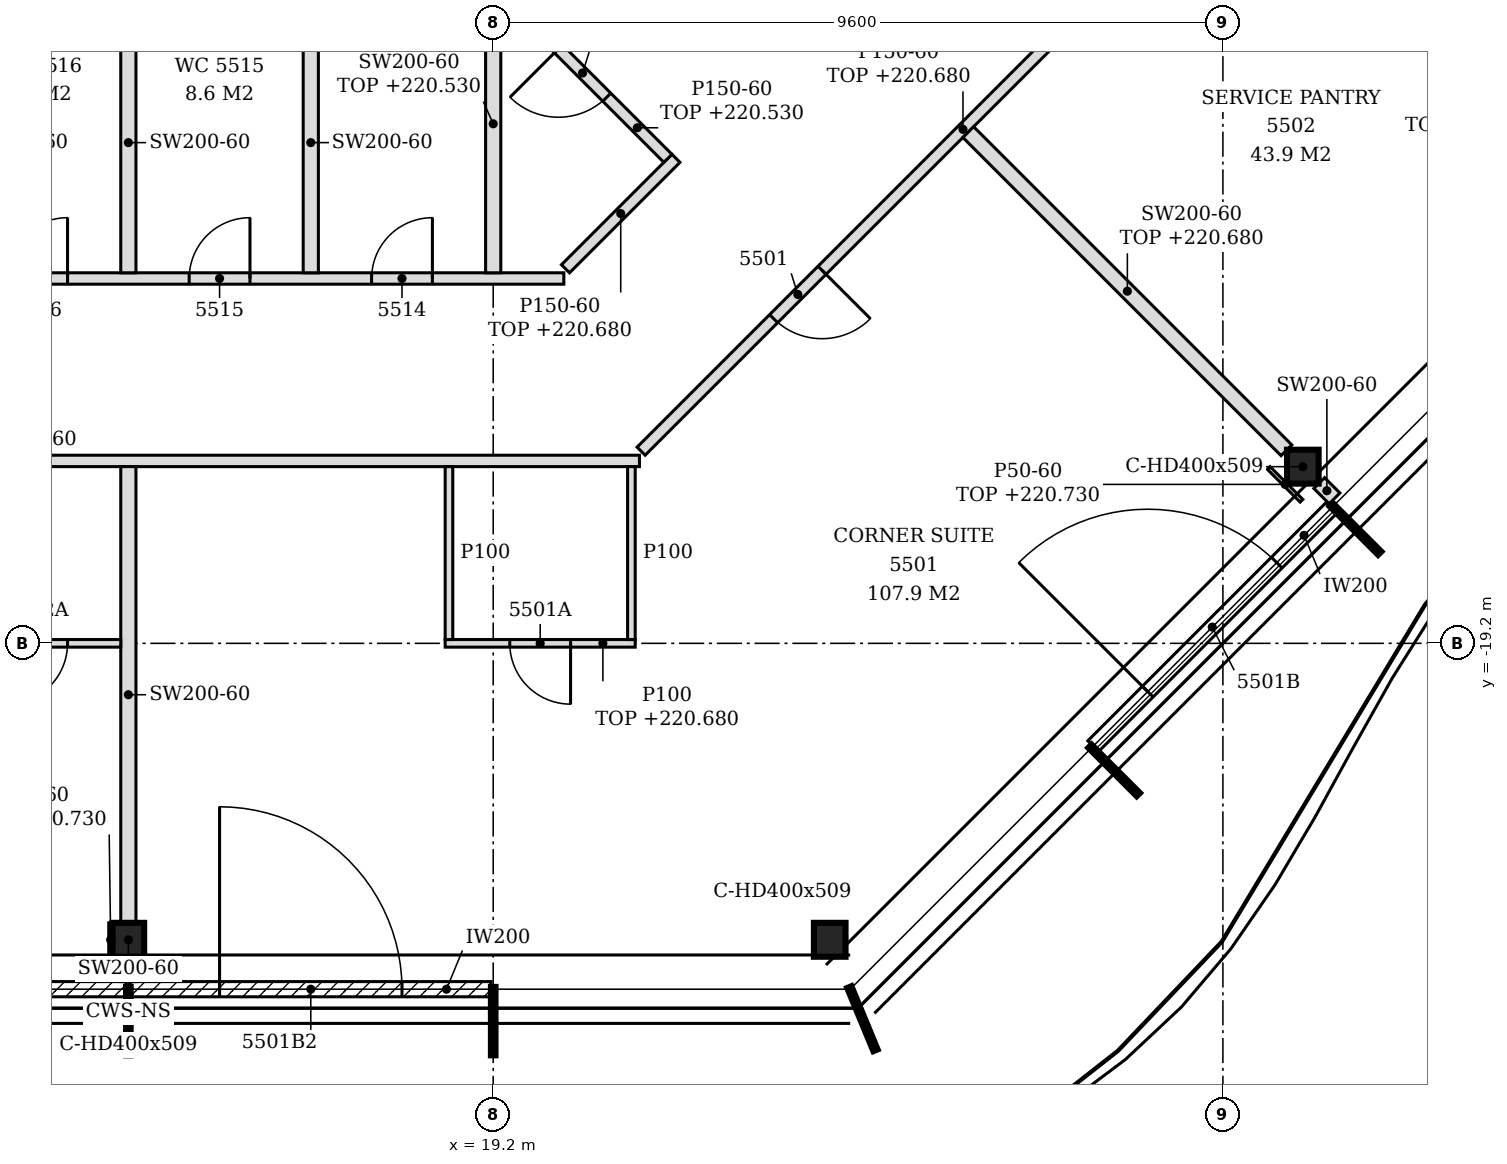
"""IFC4 building model, lengths in metres.
Left out: names, types, materials, properties, quantities, classifications, styles, units other than length and angle.
Written with IfcOpenShell. Run it as: python <this file> out.ifc"""

import sys

from ifc_helpers import new_model, si_unit, direction, frame, frame_2d, origin, origin_2d, place, context, subcontext, project, spatial, polyline, rectangle, i_section, outline, extrude, element, fill, save


model = new_model("IFC4")
c1 = context("Model", 3, precision=1e-05, world=origin(), true_north=direction((0.0, 1.0)))
c2 = subcontext(c1, "Body", "Model", "MODEL_VIEW")
j1 = project(units=[si_unit("LENGTHUNIT", "METRE"), si_unit("PLANEANGLEUNIT", "RADIAN")], contexts=[c1])
p1 = place(None, origin())
s1 = spatial("IfcSite", under=j1, at=p1, CompositionType="ELEMENT")
p2 = place(p1, origin())
s2 = spatial("IfcBuilding", under=s1, at=p2, CompositionType="ELEMENT")
p3 = place(p2, frame((0.0, 0.0, 217.8)))
s3 = spatial("IfcBuildingStorey", under=s2, at=p3, CompositionType="ELEMENT", Elevation=217.8)
for number, where, z_axis, x_axis in (
    (1, (14.4, -23.1, -0.15), (0.0, 0.0, 1.0), (1.0, 0.0, 0.0)),
    (2, (23.627, -23.1, -0.15), (0.0, 0.0, 1.0), (1.0, 0.0, 0.0)),
    (3, (29.852, -16.876, -0.15), (0.0, 0.0, 1.0), (1.0, 0.0, 0.0)),
):
    element("IfcColumn", number, at=place(p3, frame(where, z_axis=z_axis, x_axis=x_axis)), inside=s3, PredefinedType="COLUMN", context=c2, shape_type="SweptSolid", body=[
        extrude(i_section(OverallWidth=0.416, OverallDepth=0.446, WebThickness=0.039, FlangeThickness=0.063, FilletRadius=0.015, at=origin_2d()), origin(), (0.0, 0.0, 1.0), 3.6),
    ])
p4 = place(p3, frame((9.63, -23.75, 0.0), z_axis=(0.0, 0.0, 1.0), x_axis=(1.0, 0.0, 0.0)))
e4 = element("IfcWall", 4, at=p4, inside=s3, PredefinedType="NOTDEFINED", context=c2, shape_type="SweptSolid", body=[
    extrude(rectangle(XDim=4.74, YDim=0.2, at=frame_2d((2.37, 0.0))), origin(), (0.0, 0.0, 1.0), 3.45),
])
p5 = place(p4, frame((1.17, 0.0, 0.0)))
e5 = element("IfcOpeningElement", 5, at=p5, cuts=e4, PredefinedType="OPENING", context=c2, shape_type="SweptSolid", body=[
    extrude(rectangle(XDim=2.4, YDim=2.4, at=frame_2d((1.2, 1.2))), frame((0.0, 0.11, 0.0), z_axis=(0.0, -1.0, 0.0), x_axis=(1.0, 0.0, 0.0)), (0.0, 0.0, 1.0), 0.22),
])
p6 = place(p3, frame((14.43, -23.75, 0.0), z_axis=(0.0, 0.0, 1.0), x_axis=(1.0, 0.0, 0.0)))
e6 = element("IfcWall", 6, at=p6, inside=s3, PredefinedType="NOTDEFINED", context=c2, shape_type="SweptSolid", body=[
    extrude(rectangle(XDim=4.74, YDim=0.2, at=frame_2d((2.37, 0.0))), origin(), (0.0, 0.0, 1.0), 3.45),
])
p7 = place(p6, frame((1.17, 0.0, 0.0)))
e7 = element("IfcOpeningElement", 7, at=p7, cuts=e6, PredefinedType="OPENING", context=c2, shape_type="SweptSolid", body=[
    extrude(rectangle(XDim=2.4, YDim=2.4, at=frame_2d((1.2, 1.2))), frame((0.0, 0.11, 0.0), z_axis=(0.0, -1.0, 0.0), x_axis=(1.0, 0.0, 0.0)), (0.0, 0.0, 1.0), 0.22),
])
p8 = place(p3, frame((27.093, -20.553, 0.0), z_axis=(0.0, 0.0, 1.0), x_axis=(0.707079231393, 0.707134329907, 0.0)))
e8 = element("IfcWall", 8, at=p8, inside=s3, PredefinedType="NOTDEFINED", context=c2, shape_type="SweptSolid", body=[
    extrude(rectangle(XDim=4.431, YDim=0.2, at=frame_2d((2.215, 0.0))), origin(), (0.0, 0.0, 1.0), 3.45),
])
p9 = place(p8, frame((1.015, 0.0, 0.0)))
e9 = element("IfcOpeningElement", 9, at=p9, cuts=e8, PredefinedType="OPENING", context=c2, shape_type="SweptSolid", body=[
    extrude(rectangle(XDim=2.4, YDim=2.4, at=frame_2d((1.2, 1.2))), frame((0.0, 0.11, 0.0), z_axis=(0.0, -1.0, 0.0), x_axis=(1.0, 0.0, 0.0)), (0.0, 0.0, 1.0), 0.22),
])
p10 = place(p3, frame((14.4, -23.65, 0.0), z_axis=(0.0, 0.0, 1.0), x_axis=(0.0, 1.0, 0.0)))
e10 = element("IfcWall", 10, at=p10, inside=s3, PredefinedType="PARTITIONING", context=c2, shape_type="SweptSolid", body=[
    extrude(rectangle(XDim=0.327, YDim=0.2, at=frame_2d((0.164, 0.0))), origin(), (0.0, 0.0, 1.0), 3.45),
])
p11 = place(p3, frame((14.4, -22.877, 0.0), z_axis=(0.0, 0.0, 1.0), x_axis=(0.0, 1.0, 0.0)))
e11 = element("IfcWall", 11, at=p11, inside=s3, PredefinedType="PARTITIONING", context=c2, shape_type="SweptSolid", body=[
    extrude(outline(polyline([(0.0, 0.0), (6.002, 0.0), (6.002, 3.45), (3.782, 3.45), (3.78, 2.88), (3.572, 2.88), (3.57, 3.45), (0.0, 3.45), (0.0, 0.0)])), frame((0.0, 0.1, 0.0), z_axis=(0.0, -1.0, 0.0), x_axis=(1.0, 0.0, 0.0)), (0.0, 0.0, 1.0), 0.2),
])
p12 = place(p3, frame((11.95, -19.2, 0.0), z_axis=(0.0, 0.0, 1.0), x_axis=(1.0, 0.0, 0.0)))
e12 = element("IfcWall", 12, at=p12, inside=s3, PredefinedType="PARTITIONING", context=c2, shape_type="SweptSolid", body=[
    extrude(rectangle(XDim=2.35, YDim=0.1, at=frame_2d((1.175, 0.0))), origin(), (0.0, 0.0, 1.0), 2.88),
])
p13 = place(p12, frame((0.85, 0.0, 0.0)))
e13 = element("IfcOpeningElement", 13, at=p13, cuts=e12, PredefinedType="OPENING", context=c2, shape_type="SweptSolid", body=[
    extrude(rectangle(XDim=0.8, YDim=2.1, at=frame_2d((0.4, 1.05))), frame((0.0, 0.06, 0.0), z_axis=(0.0, -1.0, 0.0), x_axis=(1.0, 0.0, 0.0)), (0.0, 0.0, 1.0), 0.12),
])
p14 = place(p3, frame((18.568, -19.2, 0.0), z_axis=(0.0, 0.0, 1.0), x_axis=(1.0, 0.0, 0.0)))
e14 = element("IfcWall", 14, at=p14, inside=s3, PredefinedType="PARTITIONING", context=c2, shape_type="SweptSolid", body=[
    extrude(outline(polyline([(0.0, 0.0), (2.5, 0.0), (2.5, 2.88), (0.782, 2.88), (0.78, 2.73), (0.482, 2.73), (0.48, 2.88), (0.0, 2.88), (0.0, 0.0)])), frame((0.0, 0.05, 0.0), z_axis=(0.0, -1.0, 0.0), x_axis=(1.0, 0.0, 0.0)), (0.0, 0.0, 1.0), 0.1),
])
p15 = place(p14, frame((0.85, 0.0, 0.0)))
e15 = element("IfcOpeningElement", 15, at=p15, cuts=e14, PredefinedType="OPENING", context=c2, shape_type="SweptSolid", body=[
    extrude(rectangle(XDim=0.8, YDim=2.1, at=frame_2d((0.4, 1.05))), frame((0.0, 0.06, 0.0), z_axis=(0.0, -1.0, 0.0), x_axis=(1.0, 0.0, 0.0)), (0.0, 0.0, 1.0), 0.12),
])
p16 = place(p3, frame((18.618, -19.15, 0.0), z_axis=(0.0, 0.0, 1.0), x_axis=(0.0, 1.0, 0.0)))
e16 = element("IfcWall", 16, at=p16, inside=s3, PredefinedType="PARTITIONING", context=c2, shape_type="SweptSolid", body=[
    extrude(outline(polyline([(0.0, 0.0), (2.275, 0.0), (2.275, 3.45), (0.055, 3.45), (0.053, 2.88), (0.0, 2.88), (0.0, 0.0)])), frame((0.0, 0.05, 0.0), z_axis=(0.0, -1.0, 0.0), x_axis=(1.0, 0.0, 0.0)), (0.0, 0.0, 1.0), 0.1),
])
p17 = place(p3, frame((21.018, -19.15, 0.0), z_axis=(0.0, 0.0, 1.0), x_axis=(0.0, 1.0, 0.0)))
e17 = element("IfcWall", 17, at=p17, inside=s3, PredefinedType="PARTITIONING", context=c2, shape_type="SweptSolid", body=[
    extrude(outline(polyline([(0.0, 0.0), (2.275, 0.0), (2.275, 3.45), (0.045, 3.45), (0.043, 2.98), (0.0, 2.98), (0.0, 0.0)])), frame((0.0, 0.05, 0.0), z_axis=(0.0, -1.0, 0.0), x_axis=(1.0, 0.0, 0.0)), (0.0, 0.0, 1.0), 0.1),
])
p18 = place(p3, frame((30.269, -17.293, 0.0), z_axis=(0.0, 0.0, 1.0), x_axis=(-0.707106781187, 0.707106781187, 0.0)))
e18 = element("IfcWall", 18, at=p18, inside=s3, PredefinedType="PARTITIONING", context=c2, shape_type="SweptSolid", body=[
    extrude(rectangle(XDim=0.285, YDim=0.2, at=frame_2d((0.143, 0.0))), origin(), (0.0, 0.0, 1.0), 3.45),
])
p19 = place(p3, frame((-0.844, -16.8, 0.0), z_axis=(0.0, 0.0, 1.0), x_axis=(1.0, 0.0, 0.0)))
e19 = element("IfcWall", 19, at=p19, inside=s3, PredefinedType="PARTITIONING", context=c2, shape_type="SweptSolid", body=[
    extrude(outline(polyline([(0.0, 0.0), (21.968, 0.0), (21.968, 3.45), (20.194, 3.45), (20.191, 2.73), (19.894, 2.73), (19.892, 3.45), (8.194, 3.45), (8.191, 2.73), (7.894, 2.73), (7.892, 3.45), (0.0, 3.45), (0.0, 0.0)])), frame((0.0, 0.075, 0.0), z_axis=(0.0, -1.0, 0.0), x_axis=(1.0, 0.0, 0.0)), (0.0, 0.0, 1.0), 0.15),
])
p20 = place(p19, frame((5.194, 0.0, 0.0)))
e20 = element("IfcOpeningElement", 20, at=p20, cuts=e19, PredefinedType="OPENING", context=c2, shape_type="SweptSolid", body=[
    extrude(rectangle(XDim=0.9, YDim=2.1, at=frame_2d((0.45, 1.05))), frame((0.0, 0.085, 0.0), z_axis=(0.0, -1.0, 0.0), x_axis=(1.0, 0.0, 0.0)), (0.0, 0.0, 1.0), 0.17),
])
p21 = place(p3, frame((21.146, -16.672, 0.0), z_axis=(0.0, 0.0, 1.0), x_axis=(0.707100999376, 0.70711256295, 0.0)))
e21 = element("IfcWall", 21, at=p21, inside=s3, PredefinedType="PARTITIONING", context=c2, shape_type="SweptSolid", body=[
    extrude(rectangle(XDim=21.113, YDim=0.15, at=frame_2d((10.556, 0.0))), origin(), (0.0, 0.0, 1.0), 2.88),
])
p22 = place(p21, frame((2.466, 0.0, 0.0)))
e22 = element("IfcOpeningElement", 22, at=p22, cuts=e21, PredefinedType="OPENING", context=c2, shape_type="SweptSolid", body=[
    extrude(rectangle(XDim=0.9, YDim=2.1, at=frame_2d((0.45, 1.05))), frame((0.0, 0.085, 0.0), z_axis=(0.0, -1.0, 0.0), x_axis=(1.0, 0.0, 0.0)), (0.0, 0.0, 1.0), 0.17),
])
p23 = place(p21, frame((8.611, 0.0, 0.0)))
e23 = element("IfcOpeningElement", 23, at=p23, cuts=e21, PredefinedType="OPENING", context=c2, shape_type="SweptSolid", body=[
    extrude(rectangle(XDim=0.9, YDim=2.1, at=frame_2d((0.45, 1.05))), frame((0.0, 0.085, 0.0), z_axis=(0.0, -1.0, 0.0), x_axis=(1.0, 0.0, 0.0)), (0.0, 0.0, 1.0), 0.17),
])
p24 = place(p21, frame((13.012, 0.0, 0.0)))
e24 = element("IfcOpeningElement", 24, at=p24, cuts=e21, PredefinedType="OPENING", context=c2, shape_type="SweptSolid", body=[
    extrude(rectangle(XDim=0.9, YDim=2.1, at=frame_2d((0.45, 1.05))), frame((0.0, 0.085, 0.0), z_axis=(0.0, -1.0, 0.0), x_axis=(1.0, 0.0, 0.0)), (0.0, 0.0, 1.0), 0.17),
])
p25 = place(p21, frame((16.261, 0.0, 0.0)))
e25 = element("IfcOpeningElement", 25, at=p25, cuts=e21, PredefinedType="OPENING", context=c2, shape_type="SweptSolid", body=[
    extrude(rectangle(XDim=0.9, YDim=2.1, at=frame_2d((0.45, 1.05))), frame((0.0, 0.085, 0.0), z_axis=(0.0, -1.0, 0.0), x_axis=(1.0, 0.0, 0.0)), (0.0, 0.0, 1.0), 0.17),
])
p26 = place(p3, frame((29.636, -16.66, 0.0), z_axis=(0.0, 0.0, 1.0), x_axis=(-0.707106781187, 0.707106781187, 0.0)))
e26 = element("IfcWall", 26, at=p26, inside=s3, PredefinedType="PARTITIONING", context=c2, shape_type="SweptSolid", body=[
    extrude(rectangle(XDim=5.92, YDim=0.2, at=frame_2d((2.96, 0.0))), origin(), (0.0, 0.0, 1.0), 2.88),
])
p27 = place(p3, frame((2.325, -14.4, 0.0), z_axis=(0.0, 0.0, 1.0), x_axis=(1.0, 0.0, 0.0)))
e27 = element("IfcWall", 27, at=p27, inside=s3, PredefinedType="PARTITIONING", context=c2, shape_type="SweptSolid", body=[
    extrude(outline(polyline([(0.0, 0.0), (17.804, 0.0), (17.804, 2.88), (17.025, 2.88), (17.023, 2.73), (16.725, 2.73), (16.723, 2.88), (5.025, 2.88), (5.023, 2.73), (4.725, 2.73), (4.723, 2.88), (0.0, 2.88), (0.0, 0.0)])), frame((0.0, 0.075, 0.0), z_axis=(0.0, -1.0, 0.0), x_axis=(1.0, 0.0, 0.0)), (0.0, 0.0, 1.0), 0.15),
])
p28 = place(p27, frame((15.275, 0.0, 0.0)))
e28 = element("IfcOpeningElement", 28, at=p28, cuts=e27, PredefinedType="OPENING", context=c2, shape_type="SweptSolid", body=[
    extrude(rectangle(XDim=0.8, YDim=2.1, at=frame_2d((0.4, 1.05))), frame((0.0, 0.085, 0.0), z_axis=(0.0, -1.0, 0.0), x_axis=(1.0, 0.0, 0.0)), (0.0, 0.0, 1.0), 0.17),
])
p29 = place(p27, frame((12.875, 0.0, 0.0)))
e29 = element("IfcOpeningElement", 29, at=p29, cuts=e27, PredefinedType="OPENING", context=c2, shape_type="SweptSolid", body=[
    extrude(rectangle(XDim=0.8, YDim=2.1, at=frame_2d((0.4, 1.05))), frame((0.0, 0.085, 0.0), z_axis=(0.0, -1.0, 0.0), x_axis=(1.0, 0.0, 0.0)), (0.0, 0.0, 1.0), 0.17),
])
p30 = place(p27, frame((10.475, 0.0, 0.0)))
e30 = element("IfcOpeningElement", 30, at=p30, cuts=e27, PredefinedType="OPENING", context=c2, shape_type="SweptSolid", body=[
    extrude(rectangle(XDim=0.8, YDim=2.1, at=frame_2d((0.4, 1.05))), frame((0.0, 0.085, 0.0), z_axis=(0.0, -1.0, 0.0), x_axis=(1.0, 0.0, 0.0)), (0.0, 0.0, 1.0), 0.17),
])
for number, where, z_axis, x_axis in (
    (31, (14.4, -14.325, 0.0), (0.0, 0.0, 1.0), (0.0, 1.0, 0.0)),
    (32, (16.8, -14.325, 0.0), (0.0, 0.0, 1.0), (0.0, 1.0, 0.0)),
):
    element("IfcWall", number, at=place(p3, frame(where, z_axis=z_axis, x_axis=x_axis)), inside=s3, PredefinedType="PARTITIONING", context=c2, shape_type="SweptSolid", body=[
        extrude(outline(polyline([(0.0, 0.0), (3.425, 0.0), (3.425, 3.45), (0.03, 3.45), (0.028, 2.88), (0.0, 2.88), (0.0, 0.0)])), frame((0.0, 0.1, 0.0), z_axis=(0.0, -1.0, 0.0), x_axis=(1.0, 0.0, 0.0)), (0.0, 0.0, 1.0), 0.2),
    ])
p31 = place(p3, frame((19.2, -14.325, 0.0), z_axis=(0.0, 0.0, 1.0), x_axis=(0.0, 1.0, 0.0)))
e33 = element("IfcWall", 33, at=p31, inside=s3, PredefinedType="PARTITIONING", context=c2, shape_type="SweptSolid", body=[
    extrude(rectangle(XDim=3.92, YDim=0.2, at=frame_2d((1.96, 0.0))), origin(), (0.0, 0.0, 1.0), 2.73),
])
p32 = place(p3, frame((20.151, -14.272, 0.0), z_axis=(0.0, 0.0, 1.0), x_axis=(0.707106781187, 0.707106781187, 0.0)))
e34 = element("IfcWall", 34, at=p32, inside=s3, PredefinedType="PARTITIONING", context=c2, shape_type="SweptSolid", body=[
    extrude(rectangle(XDim=2.055, YDim=0.15, at=frame_2d((1.027, 0.0))), origin(), (0.0, 0.0, 1.0), 2.88),
])
p33 = place(p3, frame((34.581, -12.981, 0.0), z_axis=(0.0, 0.0, 1.0), x_axis=(-0.707133900936, 0.707079660397, 0.0)))
e35 = element("IfcWall", 35, at=p33, inside=s3, PredefinedType="PARTITIONING", context=c2, shape_type="SweptSolid", body=[
    extrude(rectangle(XDim=4.501, YDim=0.2, at=frame_2d((2.25, 0.0))), origin(), (0.0, 0.0, 1.0), 2.63),
])
p34 = place(p3, frame((21.498, -12.819, 0.0), z_axis=(0.0, 0.0, 1.0), x_axis=(-0.707106781187, 0.707106781187, 0.0)))
e36 = element("IfcWall", 36, at=p34, inside=s3, PredefinedType="PARTITIONING", context=c2, shape_type="SweptSolid", body=[
    extrude(rectangle(XDim=3.033, YDim=0.15, at=frame_2d((1.517, 0.0))), origin(), (0.0, 0.0, 1.0), 2.73),
])
p35 = place(p34, frame((1.137, 0.0, 0.0)))
e37 = element("IfcOpeningElement", 37, at=p35, cuts=e36, PredefinedType="OPENING", context=c2, shape_type="SweptSolid", body=[
    extrude(rectangle(XDim=0.9, YDim=2.1, at=frame_2d((0.45, 1.05))), frame((0.0, 0.085, 0.0), z_axis=(0.0, -1.0, 0.0), x_axis=(1.0, 0.0, 0.0)), (0.0, 0.0, 1.0), 0.17),
])
p36 = place(p3, frame((14.167, -23.323, 0.0), z_axis=(0.0, 0.0, 1.0), x_axis=(0.0, 1.0, 0.0)))
e38 = element("IfcWall", 38, at=p36, inside=s3, PredefinedType="PARTITIONING", context=c2, shape_type="SweptSolid", body=[
    extrude(rectangle(XDim=0.446, YDim=0.05, at=frame_2d((0.223, 0.0))), origin(), (0.0, 0.0, 1.0), 2.93),
])
p37 = place(p3, frame((29.834, -17.324, 0.0), z_axis=(0.0, 0.0, 1.0), x_axis=(-0.706906496032, 0.707307009627, 0.0)))
e39 = element("IfcWall", 39, at=p37, inside=s3, PredefinedType="PARTITIONING", context=c2, shape_type="SweptSolid", body=[
    extrude(rectangle(XDim=0.61, YDim=0.05, at=frame_2d((0.305, 0.0))), origin(), (0.0, 0.0, 1.0), 2.93),
])
p38 = place(p7, origin())
e40 = element("IfcDoor", 40, at=p38, inside=s3, OperationType="SINGLE_SWING_LEFT", PredefinedType="DOOR", context=c2, shape_type="SweptSolid", body=[
    extrude(rectangle(XDim=2.4, YDim=2.4, at=frame_2d((1.2, 1.2))), frame((0.0, 0.025, 0.0), z_axis=(0.0, -1.0, 0.0), x_axis=(1.0, 0.0, 0.0)), (0.0, 0.0, 1.0), 0.05),
])
fill(e7, e40)
p39 = place(p9, origin())
e41 = element("IfcDoor", 41, at=p39, inside=s3, OperationType="SINGLE_SWING_LEFT", PredefinedType="DOOR", context=c2, shape_type="SweptSolid", body=[
    extrude(rectangle(XDim=2.4, YDim=2.4, at=frame_2d((1.2, 1.2))), frame((0.0, 0.025, 0.0), z_axis=(0.0, -1.0, 0.0), x_axis=(1.0, 0.0, 0.0)), (0.0, 0.0, 1.0), 0.05),
])
fill(e9, e41)
p40 = place(p22, frame((0.9, 0.0, 0.0), z_axis=(0.0, 0.0, 1.0), x_axis=(-1.0, 0.0, 0.0)))
e42 = element("IfcDoor", 42, at=p40, inside=s3, OperationType="SINGLE_SWING_LEFT", PredefinedType="DOOR", context=c2, shape_type="SweptSolid", body=[
    extrude(rectangle(XDim=0.9, YDim=2.1, at=frame_2d((0.45, 1.05))), frame((0.0, 0.025, 0.0), z_axis=(0.0, -1.0, 0.0), x_axis=(1.0, 0.0, 0.0)), (0.0, 0.0, 1.0), 0.05),
])
fill(e22, e42)
p41 = place(p15, frame((0.8, 0.0, 0.0), z_axis=(0.0, 0.0, 1.0), x_axis=(-1.0, 0.0, 0.0)))
e43 = element("IfcDoor", 43, at=p41, inside=s3, OperationType="SINGLE_SWING_LEFT", PredefinedType="DOOR", context=c2, shape_type="SweptSolid", body=[
    extrude(rectangle(XDim=0.8, YDim=2.1, at=frame_2d((0.4, 1.05))), frame((0.0, 0.025, 0.0), z_axis=(0.0, -1.0, 0.0), x_axis=(1.0, 0.0, 0.0)), (0.0, 0.0, 1.0), 0.05),
])
fill(e15, e43)
p42 = place(p13, frame((0.8, 0.0, 0.0), z_axis=(0.0, 0.0, 1.0), x_axis=(-1.0, 0.0, 0.0)))
e44 = element("IfcDoor", 44, at=p42, inside=s3, OperationType="SINGLE_SWING_RIGHT", PredefinedType="DOOR", context=c2, shape_type="SweptSolid", body=[
    extrude(rectangle(XDim=0.8, YDim=2.1, at=frame_2d((0.4, 1.05))), frame((0.0, 0.025, 0.0), z_axis=(0.0, -1.0, 0.0), x_axis=(1.0, 0.0, 0.0)), (0.0, 0.0, 1.0), 0.05),
])
fill(e13, e44)
p43 = place(p28, origin())
e45 = element("IfcDoor", 45, at=p43, inside=s3, OperationType="SINGLE_SWING_RIGHT", PredefinedType="DOOR", context=c2, shape_type="SweptSolid", body=[
    extrude(rectangle(XDim=0.8, YDim=2.1, at=frame_2d((0.4, 1.05))), frame((0.0, 0.025, 0.0), z_axis=(0.0, -1.0, 0.0), x_axis=(1.0, 0.0, 0.0)), (0.0, 0.0, 1.0), 0.05),
])
fill(e28, e45)
p44 = place(p29, origin())
e46 = element("IfcDoor", 46, at=p44, inside=s3, OperationType="SINGLE_SWING_RIGHT", PredefinedType="DOOR", context=c2, shape_type="SweptSolid", body=[
    extrude(rectangle(XDim=0.8, YDim=2.1, at=frame_2d((0.4, 1.05))), frame((0.0, 0.025, 0.0), z_axis=(0.0, -1.0, 0.0), x_axis=(1.0, 0.0, 0.0)), (0.0, 0.0, 1.0), 0.05),
])
fill(e29, e46)
p45 = place(p30, origin())
e47 = element("IfcDoor", 47, at=p45, inside=s3, OperationType="SINGLE_SWING_RIGHT", PredefinedType="DOOR", context=c2, shape_type="SweptSolid", body=[
    extrude(rectangle(XDim=0.8, YDim=2.1, at=frame_2d((0.4, 1.05))), frame((0.0, 0.025, 0.0), z_axis=(0.0, -1.0, 0.0), x_axis=(1.0, 0.0, 0.0)), (0.0, 0.0, 1.0), 0.05),
])
fill(e30, e47)
p46 = place(p35, origin())
e48 = element("IfcDoor", 48, at=p46, inside=s3, OperationType="SINGLE_SWING_RIGHT", PredefinedType="DOOR", context=c2, shape_type="SweptSolid", body=[
    extrude(rectangle(XDim=0.9, YDim=2.1, at=frame_2d((0.45, 1.05))), frame((0.0, 0.025, 0.0), z_axis=(0.0, -1.0, 0.0), x_axis=(1.0, 0.0, 0.0)), (0.0, 0.0, 1.0), 0.05),
])
fill(e37, e48)
save(model, sys.argv[1])
